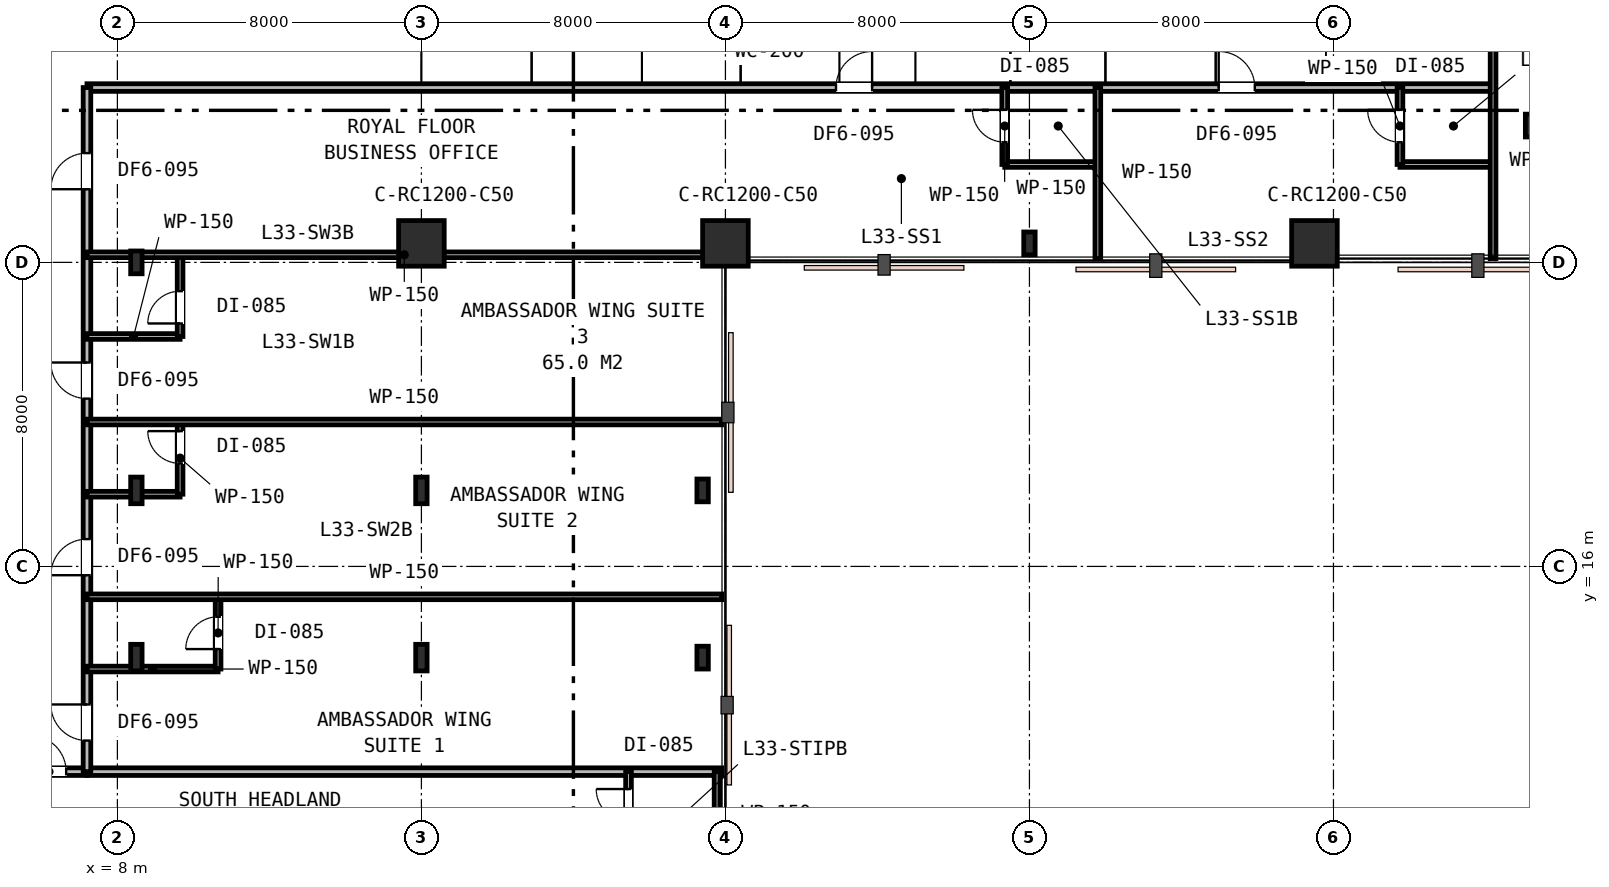
"""IFC4 building model, lengths in metres.
Left out: names, types, materials, properties, quantities, classifications, styles, units other than length and angle.
Written with IfcOpenShell. Run it as: python <this file> out.ifc"""

import sys

from ifc_helpers import new_model, si_unit, direction, frame, frame_2d, origin, origin_2d, place, context, subcontext, project, spatial, rectangle, i_section, extrude, element, fill, save


model = new_model("IFC4")
c1 = context("Model", 3, precision=1e-05, world=origin(), true_north=direction((0.0, 1.0)))
c2 = subcontext(c1, "Body", "Model", "MODEL_VIEW")
j1 = project(units=[si_unit("LENGTHUNIT", "METRE"), si_unit("PLANEANGLEUNIT", "RADIAN")], contexts=[c1])
p1 = place(None, origin())
s1 = spatial("IfcSite", under=j1, at=p1, CompositionType="ELEMENT")
p2 = place(p1, origin())
s2 = spatial("IfcBuilding", under=s1, at=p2, CompositionType="ELEMENT")
p3 = place(p2, frame((0.0, 0.0, 129.6)))
s3 = spatial("IfcBuildingStorey", under=s2, at=p3, CompositionType="ELEMENT", Elevation=129.6)
p4 = place(p3, frame((8.5, 24.0, 0.0), z_axis=(0.0, 0.0, 1.0), x_axis=(1.0, 0.0, 0.0)))
e1 = element("IfcColumn", 1, at=p4, inside=s3, PredefinedType="COLUMN", context=c2, shape_type="SweptSolid", body=[
    extrude(i_section(OverallWidth=0.3, OverallDepth=0.6, WebThickness=0.015, FlangeThickness=0.03, FilletRadius=0.027, at=origin_2d()), origin(), (0.0, 0.0, 1.0), 3.6),
])
for number, where, z_axis, x_axis in (
    (2, (16.0, 24.5, 0.0), (0.0, 0.0, 1.0), (1.0, 0.0, 0.0)),
    (3, (24.0, 24.5, 0.0), (0.0, 0.0, 1.0), (1.0, 0.0, 0.0)),
):
    element("IfcColumn", number, at=place(p3, frame(where, z_axis=z_axis, x_axis=x_axis)), inside=s3, PredefinedType="COLUMN", context=c2, shape_type="SweptSolid", body=[
        extrude(rectangle(XDim=1.2, YDim=1.2, at=origin_2d()), origin(), (0.0, 0.0, 1.0), 3.6),
    ])
p5 = place(p3, frame((32.0, 24.5, 0.0), z_axis=(0.0, 0.0, 1.0), x_axis=(1.0, 0.0, 0.0)))
e4 = element("IfcColumn", 4, at=p5, inside=s3, PredefinedType="COLUMN", context=c2, shape_type="SweptSolid", body=[
    extrude(i_section(OverallWidth=0.3, OverallDepth=0.6, WebThickness=0.015, FlangeThickness=0.03, FilletRadius=0.027, at=origin_2d()), origin(), (0.0, 0.0, 1.0), 3.6),
])
p6 = place(p3, frame((39.5, 24.5, 0.0), z_axis=(0.0, 0.0, 1.0), x_axis=(1.0, 0.0, 0.0)))
e5 = element("IfcColumn", 5, at=p6, inside=s3, PredefinedType="COLUMN", context=c2, shape_type="SweptSolid", body=[
    extrude(rectangle(XDim=1.2, YDim=1.2, at=origin_2d()), origin(), (0.0, 0.0, 1.0), 3.6),
])
for number, where, z_axis, x_axis in (
    (6, (45.2, 27.6, 0.0), (0.0, 0.0, 1.0), (1.0, 0.0, 0.0)),
    (7, (23.4, 13.6, 0.0), (0.0, 0.0, 1.0), (1.0, 0.0, 0.0)),
    (8, (23.4, 18.0, 0.0), (0.0, 0.0, 1.0), (1.0, 0.0, 0.0)),
):
    element("IfcColumn", number, at=place(p3, frame(where, z_axis=z_axis, x_axis=x_axis)), inside=s3, PredefinedType="COLUMN", context=c2, shape_type="SweptSolid", body=[
        extrude(i_section(OverallWidth=0.3, OverallDepth=0.6, WebThickness=0.015, FlangeThickness=0.03, FilletRadius=0.027, at=origin_2d()), origin(), (0.0, 0.0, 1.0), 3.6),
    ])
for number, where, z_axis, x_axis in (
    (9, (8.5, 13.6, 0.0), (0.0, 0.0, 1.0), (1.0, 0.0, 0.0)),
    (10, (16.0, 13.6, 0.0), (0.0, 0.0, 1.0), (1.0, 0.0, 0.0)),
    (11, (8.5, 18.0, 0.0), (0.0, 0.0, 1.0), (1.0, 0.0, 0.0)),
    (12, (16.0, 18.0, 0.0), (0.0, 0.0, 1.0), (1.0, 0.0, 0.0)),
):
    element("IfcColumn", number, at=place(p3, frame(where, z_axis=z_axis, x_axis=x_axis)), inside=s3, PredefinedType="COLUMN", context=c2, shape_type="SweptSolid", body=[
        extrude(i_section(OverallWidth=0.3, OverallDepth=0.7, WebThickness=0.017, FlangeThickness=0.032, FilletRadius=0.027, at=origin_2d()), origin(), (0.0, 0.0, 1.0), 3.6),
    ])
p7 = place(p3, frame((7.2, 28.6, 0.0), z_axis=(0.0, 0.0, 1.0), x_axis=(1.0, 0.0, 0.0)))
e13 = element("IfcWall", 13, at=p7, inside=s3, PredefinedType="PARTITIONING", context=c2, shape_type="SweptSolid", body=[
    extrude(rectangle(XDim=37.0, YDim=0.2, at=frame_2d((18.5, 0.0))), origin(), (0.0, 0.0, 1.0), 2.87),
])
p8 = place(p7, frame((19.71, 0.0, 0.0)))
e14 = element("IfcOpeningElement", 14, at=p8, cuts=e13, PredefinedType="OPENING", context=c2, shape_type="SweptSolid", body=[
    extrude(rectangle(XDim=0.95, YDim=2.15, at=frame_2d((0.475, 1.075))), frame((0.0, 0.11, 0.0), z_axis=(0.0, -1.0, 0.0), x_axis=(1.0, 0.0, 0.0)), (0.0, 0.0, 1.0), 0.22),
])
p9 = place(p7, frame((29.78, 0.0, 0.0)))
e15 = element("IfcOpeningElement", 15, at=p9, cuts=e13, PredefinedType="OPENING", context=c2, shape_type="SweptSolid", body=[
    extrude(rectangle(XDim=0.95, YDim=2.15, at=frame_2d((0.475, 1.075))), frame((0.0, 0.11, 0.0), z_axis=(0.0, -1.0, 0.0), x_axis=(1.0, 0.0, 0.0)), (0.0, 0.0, 1.0), 0.22),
])
p10 = place(p3, frame((7.2, 10.6, 0.0), z_axis=(0.0, 0.0, 1.0), x_axis=(1.0, 0.0, 0.0)))
e16 = element("IfcWall", 16, at=p10, inside=s3, PredefinedType="PARTITIONING", context=c2, shape_type="SweptSolid", body=[
    extrude(rectangle(XDim=16.7, YDim=0.2, at=frame_2d((8.35, 0.0))), origin(), (0.0, 0.0, 1.0), 2.87),
])
p11 = place(p3, frame((5.2, 10.6, 0.0), z_axis=(0.0, 0.0, 1.0), x_axis=(1.0, 0.0, 0.0)))
e17 = element("IfcWall", 17, at=p11, inside=s3, PredefinedType="PARTITIONING", context=c2, shape_type="SweptSolid", body=[
    extrude(rectangle(XDim=2.0, YDim=0.2, at=frame_2d((1.0, 0.0))), origin(), (0.0, 0.0, 1.0), 3.01),
])
p12 = place(p11, frame((0.502, 0.0, 0.0)))
e18 = element("IfcOpeningElement", 18, at=p12, cuts=e17, PredefinedType="OPENING", context=c2, shape_type="SweptSolid", body=[
    extrude(rectangle(XDim=0.95, YDim=2.15, at=frame_2d((0.475, 1.075))), frame((0.0, 0.11, 0.0), z_axis=(0.0, -1.0, 0.0), x_axis=(1.0, 0.0, 0.0)), (0.0, 0.0, 1.0), 0.22),
])
p13 = place(p3, frame((21.45, 8.4, 0.0), z_axis=(0.0, 0.0, 1.0), x_axis=(0.0, 1.0, 0.0)))
e19 = element("IfcWall", 19, at=p13, inside=s3, PredefinedType="PARTITIONING", context=c2, shape_type="SweptSolid", body=[
    extrude(rectangle(XDim=2.2, YDim=0.15, at=frame_2d((1.1, 0.0))), origin(), (0.0, 0.0, 1.0), 2.87),
])
p14 = place(p13, frame((0.892, 0.0, 0.0)))
e20 = element("IfcOpeningElement", 20, at=p14, cuts=e19, PredefinedType="OPENING", context=c2, shape_type="SweptSolid", body=[
    extrude(rectangle(XDim=0.85, YDim=2.15, at=frame_2d((0.425, 1.075))), frame((0.0, 0.085, 0.0), z_axis=(0.0, -1.0, 0.0), x_axis=(1.0, 0.0, 0.0)), (0.0, 0.0, 1.0), 0.17),
])
p15 = place(p3, frame((23.78, 10.6, 0.0), z_axis=(0.0, 0.0, 1.0), x_axis=(0.0, -1.0, 0.0)))
e21 = element("IfcWall", 21, at=p15, inside=s3, PredefinedType="PARTITIONING", context=c2, shape_type="SweptSolid", body=[
    extrude(rectangle(XDim=2.22, YDim=0.15, at=frame_2d((1.11, 0.0))), origin(), (0.0, 0.0, 1.0), 2.87),
])
p16 = place(p3, frame((7.2, 10.6, 0.0), z_axis=(0.0, 0.0, 1.0), x_axis=(0.0, 1.0, 0.0)))
e22 = element("IfcWall", 22, at=p16, inside=s3, PredefinedType="PARTITIONING", context=c2, shape_type="SweptSolid", body=[
    extrude(rectangle(XDim=18.0, YDim=0.2, at=frame_2d((9.0, 0.0))), origin(), (0.0, 0.0, 1.0), 2.87),
])
p17 = place(p16, frame((0.818, 0.0, 0.0)))
e23 = element("IfcOpeningElement", 23, at=p17, cuts=e22, PredefinedType="OPENING", context=c2, shape_type="SweptSolid", body=[
    extrude(rectangle(XDim=0.95, YDim=2.15, at=frame_2d((0.475, 1.075))), frame((0.0, 0.11, 0.0), z_axis=(0.0, -1.0, 0.0), x_axis=(1.0, 0.0, 0.0)), (0.0, 0.0, 1.0), 0.22),
])
p18 = place(p16, frame((5.169, 0.0, 0.0)))
e24 = element("IfcOpeningElement", 24, at=p18, cuts=e22, PredefinedType="OPENING", context=c2, shape_type="SweptSolid", body=[
    extrude(rectangle(XDim=0.95, YDim=2.15, at=frame_2d((0.475, 1.075))), frame((0.0, 0.11, 0.0), z_axis=(0.0, -1.0, 0.0), x_axis=(1.0, 0.0, 0.0)), (0.0, 0.0, 1.0), 0.22),
])
p19 = place(p16, frame((9.815, 0.0, 0.0)))
e25 = element("IfcOpeningElement", 25, at=p19, cuts=e22, PredefinedType="OPENING", context=c2, shape_type="SweptSolid", body=[
    extrude(rectangle(XDim=0.95, YDim=2.15, at=frame_2d((0.475, 1.075))), frame((0.0, 0.11, 0.0), z_axis=(0.0, -1.0, 0.0), x_axis=(1.0, 0.0, 0.0)), (0.0, 0.0, 1.0), 0.22),
])
p20 = place(p16, frame((15.325, 0.0, 0.0)))
e26 = element("IfcOpeningElement", 26, at=p20, cuts=e22, PredefinedType="OPENING", context=c2, shape_type="SweptSolid", body=[
    extrude(rectangle(XDim=0.95, YDim=2.15, at=frame_2d((0.475, 1.075))), frame((0.0, 0.11, 0.0), z_axis=(0.0, -1.0, 0.0), x_axis=(1.0, 0.0, 0.0)), (0.0, 0.0, 1.0), 0.22),
])
p21 = place(p3, frame((7.2, 13.3, 0.0), z_axis=(0.0, 0.0, 1.0), x_axis=(1.0, 0.0, 0.0)))
e27 = element("IfcWall", 27, at=p21, inside=s3, PredefinedType="PARTITIONING", context=c2, shape_type="SweptSolid", body=[
    extrude(rectangle(XDim=3.45, YDim=0.15, at=frame_2d((1.725, 0.0))), origin(), (0.0, 0.0, 1.0), 2.87),
])
p22 = place(p3, frame((10.65, 13.3, 0.0), z_axis=(0.0, 0.0, 1.0), x_axis=(0.0, 1.0, 0.0)))
e28 = element("IfcWall", 28, at=p22, inside=s3, PredefinedType="PARTITIONING", context=c2, shape_type="SweptSolid", body=[
    extrude(rectangle(XDim=1.9, YDim=0.15, at=frame_2d((0.95, 0.0))), origin(), (0.0, 0.0, 1.0), 2.87),
])
p23 = place(p22, frame((0.525, 0.0, 0.0)))
e29 = element("IfcOpeningElement", 29, at=p23, cuts=e28, PredefinedType="OPENING", context=c2, shape_type="SweptSolid", body=[
    extrude(rectangle(XDim=0.85, YDim=2.15, at=frame_2d((0.425, 1.075))), frame((0.0, 0.085, 0.0), z_axis=(0.0, -1.0, 0.0), x_axis=(1.0, 0.0, 0.0)), (0.0, 0.0, 1.0), 0.17),
])
p24 = place(p3, frame((7.2, 15.2, 0.0), z_axis=(0.0, 0.0, 1.0), x_axis=(1.0, 0.0, 0.0)))
e30 = element("IfcWall", 30, at=p24, inside=s3, PredefinedType="PARTITIONING", context=c2, shape_type="SweptSolid", body=[
    extrude(rectangle(XDim=16.7, YDim=0.15, at=frame_2d((8.35, 0.0))), origin(), (0.0, 0.0, 1.0), 2.87),
])
p25 = place(p3, frame((7.2, 17.9, 0.0), z_axis=(0.0, 0.0, 1.0), x_axis=(1.0, 0.0, 0.0)))
e31 = element("IfcWall", 31, at=p25, inside=s3, PredefinedType="PARTITIONING", context=c2, shape_type="SweptSolid", body=[
    extrude(rectangle(XDim=2.45, YDim=0.15, at=frame_2d((1.225, 0.0))), origin(), (0.0, 0.0, 1.0), 2.87),
])
p26 = place(p3, frame((9.65, 17.9, 0.0), z_axis=(0.0, 0.0, 1.0), x_axis=(0.0, 1.0, 0.0)))
e32 = element("IfcWall", 32, at=p26, inside=s3, PredefinedType="PARTITIONING", context=c2, shape_type="SweptSolid", body=[
    extrude(rectangle(XDim=1.9, YDim=0.15, at=frame_2d((0.95, 0.0))), origin(), (0.0, 0.0, 1.0), 2.87),
])
p27 = place(p26, frame((0.81, 0.0, 0.0)))
e33 = element("IfcOpeningElement", 33, at=p27, cuts=e32, PredefinedType="OPENING", context=c2, shape_type="SweptSolid", body=[
    extrude(rectangle(XDim=0.85, YDim=2.15, at=frame_2d((0.425, 1.075))), frame((0.0, 0.085, 0.0), z_axis=(0.0, -1.0, 0.0), x_axis=(1.0, 0.0, 0.0)), (0.0, 0.0, 1.0), 0.17),
])
p28 = place(p3, frame((7.2, 19.8, 0.0), z_axis=(0.0, 0.0, 1.0), x_axis=(1.0, 0.0, 0.0)))
e34 = element("IfcWall", 34, at=p28, inside=s3, PredefinedType="PARTITIONING", context=c2, shape_type="SweptSolid", body=[
    extrude(rectangle(XDim=16.7, YDim=0.15, at=frame_2d((8.35, 0.0))), origin(), (0.0, 0.0, 1.0), 2.87),
])
p29 = place(p3, frame((7.2, 22.05, 0.0), z_axis=(0.0, 0.0, 1.0), x_axis=(1.0, 0.0, 0.0)))
e35 = element("IfcWall", 35, at=p29, inside=s3, PredefinedType="PARTITIONING", context=c2, shape_type="SweptSolid", body=[
    extrude(rectangle(XDim=2.45, YDim=0.15, at=frame_2d((1.225, 0.0))), origin(), (0.0, 0.0, 1.0), 2.87),
])
p30 = place(p3, frame((9.65, 22.05, 0.0), z_axis=(0.0, 0.0, 1.0), x_axis=(0.0, 1.0, 0.0)))
e36 = element("IfcWall", 36, at=p30, inside=s3, PredefinedType="PARTITIONING", context=c2, shape_type="SweptSolid", body=[
    extrude(rectangle(XDim=2.15, YDim=0.15, at=frame_2d((1.075, 0.0))), origin(), (0.0, 0.0, 1.0), 2.87),
])
p31 = place(p30, frame((0.343, 0.0, 0.0)))
e37 = element("IfcOpeningElement", 37, at=p31, cuts=e36, PredefinedType="OPENING", context=c2, shape_type="SweptSolid", body=[
    extrude(rectangle(XDim=0.85, YDim=2.15, at=frame_2d((0.425, 1.075))), frame((0.0, 0.085, 0.0), z_axis=(0.0, -1.0, 0.0), x_axis=(1.0, 0.0, 0.0)), (0.0, 0.0, 1.0), 0.17),
])
p32 = place(p3, frame((7.2, 24.2, 0.0), z_axis=(0.0, 0.0, 1.0), x_axis=(1.0, 0.0, 0.0)))
e38 = element("IfcWall", 38, at=p32, inside=s3, PredefinedType="PARTITIONING", context=c2, shape_type="SweptSolid", body=[
    extrude(rectangle(XDim=16.7, YDim=0.15, at=frame_2d((8.35, 0.0))), origin(), (0.0, 0.0, 1.0), 2.87),
])
p33 = place(p3, frame((31.35, 26.576, 0.0), z_axis=(0.0, 0.0, 1.0), x_axis=(1.0, 0.0, 0.0)))
e39 = element("IfcWall", 39, at=p33, inside=s3, PredefinedType="PARTITIONING", context=c2, shape_type="SweptSolid", body=[
    extrude(rectangle(XDim=2.45, YDim=0.15, at=frame_2d((1.225, 0.0))), origin(), (0.0, 0.0, 1.0), 3.33),
])
p34 = place(p3, frame((31.35, 26.576, 0.0), z_axis=(0.0, 0.0, 1.0), x_axis=(0.0, 1.0, 0.0)))
e40 = element("IfcWall", 40, at=p34, inside=s3, PredefinedType="PARTITIONING", context=c2, shape_type="SweptSolid", body=[
    extrude(rectangle(XDim=2.024, YDim=0.15, at=frame_2d((1.012, 0.0))), origin(), (0.0, 0.0, 1.0), 3.33),
])
p35 = place(p34, frame((0.587, 0.0, 0.0)))
e41 = element("IfcOpeningElement", 41, at=p35, cuts=e40, PredefinedType="OPENING", context=c2, shape_type="SweptSolid", body=[
    extrude(rectangle(XDim=0.85, YDim=2.15, at=frame_2d((0.425, 1.075))), frame((0.0, 0.085, 0.0), z_axis=(0.0, -1.0, 0.0), x_axis=(1.0, 0.0, 0.0)), (0.0, 0.0, 1.0), 0.17),
])
p36 = place(p3, frame((33.8, 28.6, 0.0), z_axis=(0.0, 0.0, 1.0), x_axis=(0.0, -1.0, 0.0)))
e42 = element("IfcWall", 42, at=p36, inside=s3, PredefinedType="PARTITIONING", context=c2, shape_type="SweptSolid", body=[
    extrude(rectangle(XDim=4.5, YDim=0.15, at=frame_2d((2.25, 0.0))), origin(), (0.0, 0.0, 1.0), 2.96),
])
p37 = place(p3, frame((41.75, 26.576, 0.0), z_axis=(0.0, 0.0, 1.0), x_axis=(1.0, 0.0, 0.0)))
e43 = element("IfcWall", 43, at=p37, inside=s3, PredefinedType="PARTITIONING", context=c2, shape_type="SweptSolid", body=[
    extrude(rectangle(XDim=2.45, YDim=0.15, at=frame_2d((1.225, 0.0))), origin(), (0.0, 0.0, 1.0), 3.33),
])
p38 = place(p3, frame((41.75, 26.576, 0.0), z_axis=(0.0, 0.0, 1.0), x_axis=(0.0, 1.0, 0.0)))
e44 = element("IfcWall", 44, at=p38, inside=s3, PredefinedType="PARTITIONING", context=c2, shape_type="SweptSolid", body=[
    extrude(rectangle(XDim=2.024, YDim=0.15, at=frame_2d((1.012, 0.0))), origin(), (0.0, 0.0, 1.0), 3.33),
])
p39 = place(p38, frame((0.587, 0.0, 0.0)))
e45 = element("IfcOpeningElement", 45, at=p39, cuts=e44, PredefinedType="OPENING", context=c2, shape_type="SweptSolid", body=[
    extrude(rectangle(XDim=0.85, YDim=2.15, at=frame_2d((0.425, 1.075))), frame((0.0, 0.085, 0.0), z_axis=(0.0, -1.0, 0.0), x_axis=(1.0, 0.0, 0.0)), (0.0, 0.0, 1.0), 0.17),
])
p40 = place(p3, frame((44.2, 30.8, 0.0), z_axis=(0.0, 0.0, 1.0), x_axis=(0.0, -1.0, 0.0)))
e46 = element("IfcWall", 46, at=p40, inside=s3, PredefinedType="PARTITIONING", context=c2, shape_type="SweptSolid", body=[
    extrude(rectangle(XDim=6.7, YDim=0.15, at=frame_2d((3.35, 0.0))), origin(), (0.0, 0.0, 1.0), 2.87),
])
p41 = place(p12, origin())
e47 = element("IfcDoor", 47, at=p41, inside=s3, OperationType="SINGLE_SWING_LEFT", PredefinedType="DOOR", context=c2, shape_type="SweptSolid", body=[
    extrude(rectangle(XDim=0.95, YDim=2.15, at=frame_2d((0.475, 1.075))), frame((0.0, 0.025, 0.0), z_axis=(0.0, -1.0, 0.0), x_axis=(1.0, 0.0, 0.0)), (0.0, 0.0, 1.0), 0.05),
])
fill(e18, e47)
p42 = place(p14, origin())
e48 = element("IfcDoor", 48, at=p42, inside=s3, OperationType="SINGLE_SWING_RIGHT", PredefinedType="DOOR", context=c2, shape_type="SweptSolid", body=[
    extrude(rectangle(XDim=0.85, YDim=2.15, at=frame_2d((0.425, 1.075))), frame((0.0, 0.025, 0.0), z_axis=(0.0, -1.0, 0.0), x_axis=(1.0, 0.0, 0.0)), (0.0, 0.0, 1.0), 0.05),
])
fill(e20, e48)
p43 = place(p17, origin())
e49 = element("IfcDoor", 49, at=p43, inside=s3, OperationType="SINGLE_SWING_RIGHT", PredefinedType="DOOR", context=c2, shape_type="SweptSolid", body=[
    extrude(rectangle(XDim=0.95, YDim=2.15, at=frame_2d((0.475, 1.075))), frame((0.0, 0.025, 0.0), z_axis=(0.0, -1.0, 0.0), x_axis=(1.0, 0.0, 0.0)), (0.0, 0.0, 1.0), 0.05),
])
fill(e23, e49)
p44 = place(p23, origin())
e50 = element("IfcDoor", 50, at=p44, inside=s3, OperationType="SINGLE_SWING_LEFT", PredefinedType="DOOR", context=c2, shape_type="SweptSolid", body=[
    extrude(rectangle(XDim=0.85, YDim=2.15, at=frame_2d((0.425, 1.075))), frame((0.0, 0.025, 0.0), z_axis=(0.0, -1.0, 0.0), x_axis=(1.0, 0.0, 0.0)), (0.0, 0.0, 1.0), 0.05),
])
fill(e29, e50)
p45 = place(p18, origin())
e51 = element("IfcDoor", 51, at=p45, inside=s3, OperationType="SINGLE_SWING_LEFT", PredefinedType="DOOR", context=c2, shape_type="SweptSolid", body=[
    extrude(rectangle(XDim=0.95, YDim=2.15, at=frame_2d((0.475, 1.075))), frame((0.0, 0.025, 0.0), z_axis=(0.0, -1.0, 0.0), x_axis=(1.0, 0.0, 0.0)), (0.0, 0.0, 1.0), 0.05),
])
fill(e24, e51)
p46 = place(p27, origin())
e52 = element("IfcDoor", 52, at=p46, inside=s3, OperationType="SINGLE_SWING_RIGHT", PredefinedType="DOOR", context=c2, shape_type="SweptSolid", body=[
    extrude(rectangle(XDim=0.85, YDim=2.15, at=frame_2d((0.425, 1.075))), frame((0.0, 0.025, 0.0), z_axis=(0.0, -1.0, 0.0), x_axis=(1.0, 0.0, 0.0)), (0.0, 0.0, 1.0), 0.05),
])
fill(e33, e52)
p47 = place(p19, origin())
e53 = element("IfcDoor", 53, at=p47, inside=s3, OperationType="SINGLE_SWING_RIGHT", PredefinedType="DOOR", context=c2, shape_type="SweptSolid", body=[
    extrude(rectangle(XDim=0.95, YDim=2.15, at=frame_2d((0.475, 1.075))), frame((0.0, 0.025, 0.0), z_axis=(0.0, -1.0, 0.0), x_axis=(1.0, 0.0, 0.0)), (0.0, 0.0, 1.0), 0.05),
])
fill(e25, e53)
p48 = place(p31, origin())
e54 = element("IfcDoor", 54, at=p48, inside=s3, OperationType="SINGLE_SWING_LEFT", PredefinedType="DOOR", context=c2, shape_type="SweptSolid", body=[
    extrude(rectangle(XDim=0.85, YDim=2.15, at=frame_2d((0.425, 1.075))), frame((0.0, 0.025, 0.0), z_axis=(0.0, -1.0, 0.0), x_axis=(1.0, 0.0, 0.0)), (0.0, 0.0, 1.0), 0.05),
])
fill(e37, e54)
p49 = place(p20, origin())
e55 = element("IfcDoor", 55, at=p49, inside=s3, OperationType="SINGLE_SWING_LEFT", PredefinedType="DOOR", context=c2, shape_type="SweptSolid", body=[
    extrude(rectangle(XDim=0.95, YDim=2.15, at=frame_2d((0.475, 1.075))), frame((0.0, 0.025, 0.0), z_axis=(0.0, -1.0, 0.0), x_axis=(1.0, 0.0, 0.0)), (0.0, 0.0, 1.0), 0.05),
])
fill(e26, e55)
p50 = place(p8, origin())
e56 = element("IfcDoor", 56, at=p50, inside=s3, OperationType="SINGLE_SWING_RIGHT", PredefinedType="DOOR", context=c2, shape_type="SweptSolid", body=[
    extrude(rectangle(XDim=0.95, YDim=2.15, at=frame_2d((0.475, 1.075))), frame((0.0, 0.025, 0.0), z_axis=(0.0, -1.0, 0.0), x_axis=(1.0, 0.0, 0.0)), (0.0, 0.0, 1.0), 0.05),
])
fill(e14, e56)
p51 = place(p35, origin())
e57 = element("IfcDoor", 57, at=p51, inside=s3, OperationType="SINGLE_SWING_RIGHT", PredefinedType="DOOR", context=c2, shape_type="SweptSolid", body=[
    extrude(rectangle(XDim=0.85, YDim=2.15, at=frame_2d((0.425, 1.075))), frame((0.0, 0.025, 0.0), z_axis=(0.0, -1.0, 0.0), x_axis=(1.0, 0.0, 0.0)), (0.0, 0.0, 1.0), 0.05),
])
fill(e41, e57)
p52 = place(p9, origin())
e58 = element("IfcDoor", 58, at=p52, inside=s3, OperationType="SINGLE_SWING_LEFT", PredefinedType="DOOR", context=c2, shape_type="SweptSolid", body=[
    extrude(rectangle(XDim=0.95, YDim=2.15, at=frame_2d((0.475, 1.075))), frame((0.0, 0.025, 0.0), z_axis=(0.0, -1.0, 0.0), x_axis=(1.0, 0.0, 0.0)), (0.0, 0.0, 1.0), 0.05),
])
fill(e15, e58)
p53 = place(p39, origin())
e59 = element("IfcDoor", 59, at=p53, inside=s3, OperationType="SINGLE_SWING_RIGHT", PredefinedType="DOOR", context=c2, shape_type="SweptSolid", body=[
    extrude(rectangle(XDim=0.85, YDim=2.15, at=frame_2d((0.425, 1.075))), frame((0.0, 0.025, 0.0), z_axis=(0.0, -1.0, 0.0), x_axis=(1.0, 0.0, 0.0)), (0.0, 0.0, 1.0), 0.05),
])
fill(e45, e59)
save(model, sys.argv[1])
